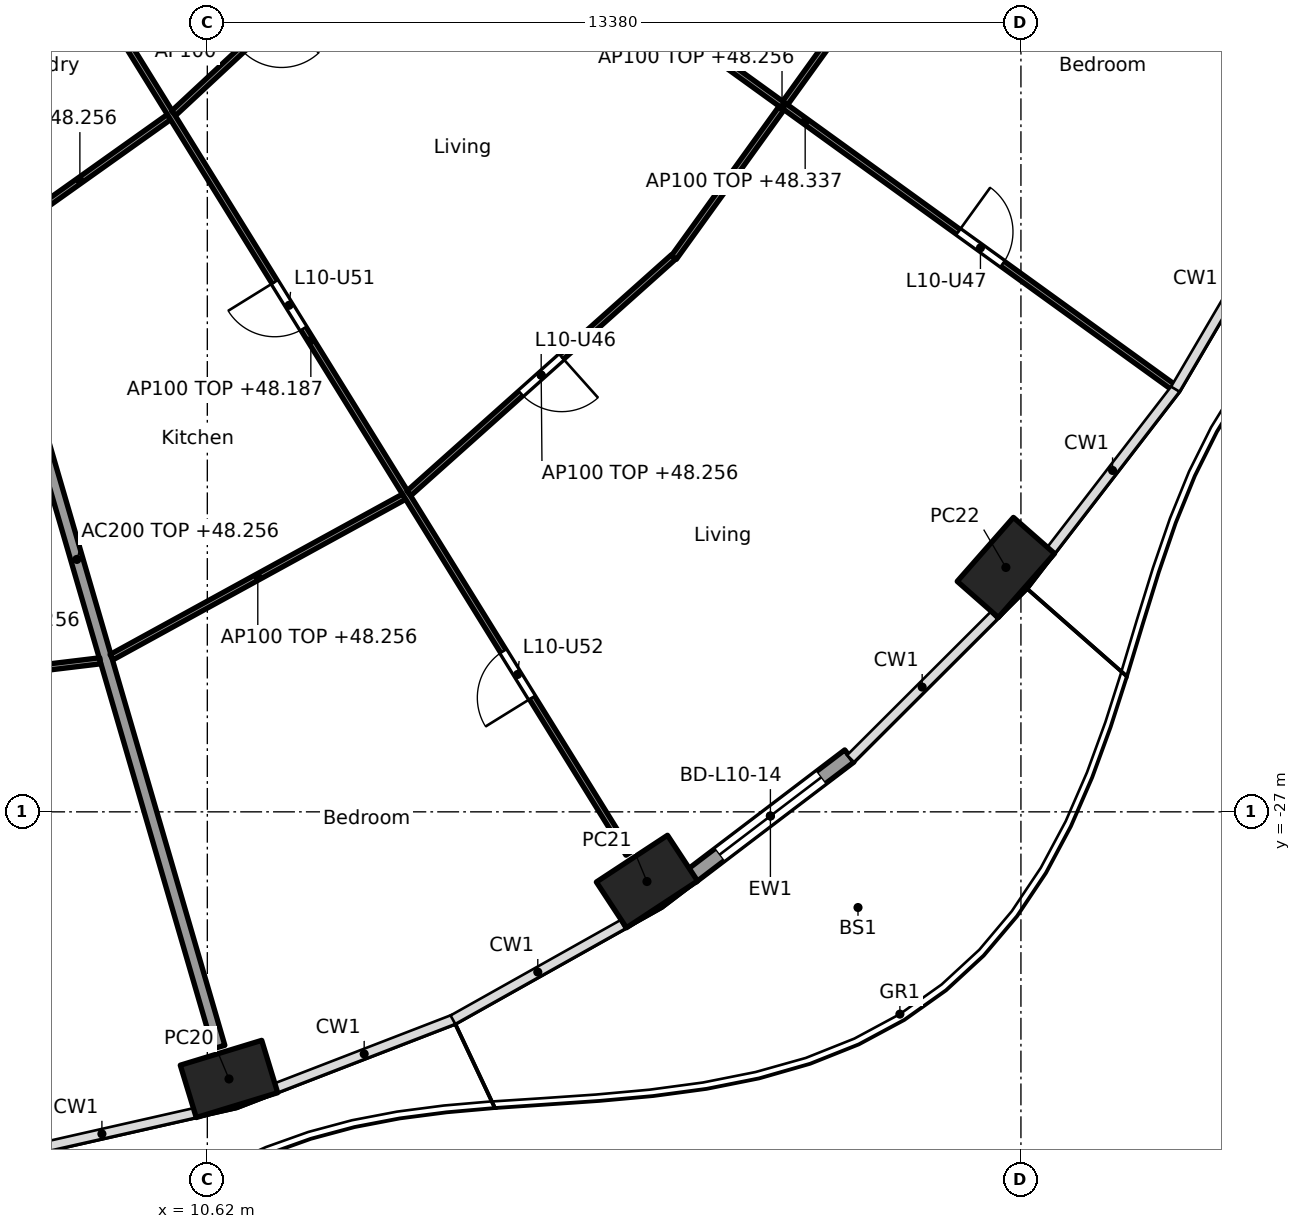
"""IFC4 building model, lengths in metres.
Left out: names, types, materials, properties, quantities, classifications, styles, units other than length and angle.
Written with IfcOpenShell. Run it as: python <this file> out.ifc"""

import sys

from ifc_helpers import new_model, si_unit, direction, frame, frame_2d, origin, origin_2d, place, context, subcontext, project, spatial, rectangle, hollow_rectangle, extrude, element, fill, save


model = new_model("IFC4")
c1 = context("Model", 3, precision=1e-05, world=origin(), true_north=direction((0.0, 1.0)))
c2 = subcontext(c1, "Body", "Model", "MODEL_VIEW")
j1 = project(units=[si_unit("LENGTHUNIT", "METRE"), si_unit("PLANEANGLEUNIT", "RADIAN")], contexts=[c1])
p1 = place(None, origin())
s1 = spatial("IfcSite", under=j1, at=p1, CompositionType="ELEMENT")
p2 = place(p1, origin())
s2 = spatial("IfcBuilding", under=s1, at=p2, CompositionType="ELEMENT")
p3 = place(p2, frame((0.0, 0.0, 45.5)))
s3 = spatial("IfcBuildingStorey", under=s2, at=p3, CompositionType="ELEMENT", Elevation=45.5)
for number, where, z_axis, x_axis in (
    (1, (10.976, -31.393, 0.0), (0.0, 0.0, 1.0), (0.957, 0.292, 0.0)),
    (2, (17.85, -28.146, 0.0), (0.0, 0.0, 1.0), (0.836, 0.549, 0.0)),
    (3, (23.752, -22.981, 0.0), (0.0, 0.0, 1.0), (0.66, 0.751, 0.0)),
):
    element("IfcColumn", number, at=place(p3, frame(where, z_axis=z_axis, x_axis=x_axis)), inside=s3, PredefinedType="COLUMN", context=c2, shape_type="SweptSolid", body=[
        extrude(hollow_rectangle(XDim=1.4, YDim=0.9, WallThickness=0.05, at=origin_2d()), origin(), (0.0, 0.0, 1.0), 3.7),
    ])
p4 = place(p3, frame((21.178, -26.081, 0.0), z_axis=(0.0, 0.0, 1.0), x_axis=(-0.796022293214, -0.605267303517, 0.0)))
e4 = element("IfcWall", 4, at=p4, inside=s3, PredefinedType="SOLIDWALL", context=c2, shape_type="SweptSolid", body=[
    extrude(rectangle(XDim=3.262, YDim=0.25, at=frame_2d((1.631, 0.0))), origin(), (0.0, 0.0, 1.0), 3.44),
])
p5 = place(p4, frame((0.581, 0.0, 0.0)))
e5 = element("IfcOpeningElement", 5, at=p5, cuts=e4, PredefinedType="OPENING", context=c2, shape_type="SweptSolid", body=[
    extrude(rectangle(XDim=2.1, YDim=2.4, at=frame_2d((1.05, 1.2))), frame((0.0, 0.135, 0.0), z_axis=(0.0, -1.0, 0.0), x_axis=(1.0, 0.0, 0.0)), (0.0, 0.0, 1.0), 0.27),
])
p6 = place(p3, frame((6.137, -14.83, 0.0), z_axis=(0.0, 0.0, 1.0), x_axis=(0.27985745069, -0.960041565399, 0.0)))
e6 = element("IfcWall", 6, at=p6, inside=s3, PredefinedType="PARTITIONING", context=c2, shape_type="SweptSolid", body=[
    extrude(rectangle(XDim=16.705, YDim=0.2, at=frame_2d((8.353, 0.0))), origin(), (0.0, 0.0, 1.0), 2.756),
])
p7 = place(p3, frame((2.941, -25.229, 0.0), z_axis=(0.0, 0.0, 1.0), x_axis=(0.992834127896, 0.119500604542, 0.0)))
e7 = element("IfcWall", 7, at=p7, inside=s3, PredefinedType="PARTITIONING", context=c2, shape_type="SweptSolid", body=[
    extrude(rectangle(XDim=5.959, YDim=0.1, at=frame_2d((2.98, 0.0))), origin(), (0.0, 0.0, 1.0), 2.756),
])
p8 = place(p3, frame((7.06, -17.657, 0.0), z_axis=(0.0, 0.0, 1.0), x_axis=(0.81492039338, 0.57957290521, 0.0)))
e8 = element("IfcWall", 8, at=p8, inside=s3, PredefinedType="PARTITIONING", context=c2, shape_type="SweptSolid", body=[
    extrude(rectangle(XDim=3.594, YDim=0.1, at=frame_2d((1.797, 0.0))), origin(), (0.0, 0.0, 1.0), 2.756),
])
p9 = place(p3, frame((9.045, -24.456, 0.0), z_axis=(0.0, 0.0, 1.0), x_axis=(0.876809987787, 0.480837025734, 0.0)))
e9 = element("IfcWall", 9, at=p9, inside=s3, PredefinedType="PARTITIONING", context=c2, shape_type="SweptSolid", body=[
    extrude(rectangle(XDim=5.486, YDim=0.1, at=frame_2d((2.743, 0.0))), origin(), (0.0, 0.0, 1.0), 2.756),
])
p10 = place(p3, frame((7.097, -10.81, 0.0), z_axis=(0.0, 0.0, 1.0), x_axis=(0.526453266471, -0.850204068576, 0.0)))
e10 = element("IfcWall", 10, at=p10, inside=s3, PredefinedType="PARTITIONING", context=c2, shape_type="SweptSolid", body=[
    extrude(rectangle(XDim=19.85, YDim=0.1, at=frame_2d((9.925, 0.0))), origin(), (0.0, 0.0, 1.0), 2.687),
])
p11 = place(p10, frame((0.35, 0.0, 0.0)))
e11 = element("IfcOpeningElement", 11, at=p11, cuts=e10, PredefinedType="OPENING", context=c2, shape_type="SweptSolid", body=[
    extrude(rectangle(XDim=0.9, YDim=2.1, at=frame_2d((0.45, 1.05))), frame((0.0, 0.06, 0.0), z_axis=(0.0, -1.0, 0.0), x_axis=(1.0, 0.0, 0.0)), (0.0, 0.0, 1.0), 0.12),
])
p12 = place(p10, frame((8.795, 0.0, 0.0)))
e12 = element("IfcOpeningElement", 12, at=p12, cuts=e10, PredefinedType="OPENING", context=c2, shape_type="SweptSolid", body=[
    extrude(rectangle(XDim=0.9, YDim=2.1, at=frame_2d((0.45, 1.05))), frame((0.0, 0.06, 0.0), z_axis=(0.0, -1.0, 0.0), x_axis=(1.0, 0.0, 0.0)), (0.0, 0.0, 1.0), 0.12),
])
p13 = place(p10, frame((15.935, 0.0, 0.0)))
e13 = element("IfcOpeningElement", 13, at=p13, cuts=e10, PredefinedType="OPENING", context=c2, shape_type="SweptSolid", body=[
    extrude(rectangle(XDim=0.9, YDim=2.1, at=frame_2d((0.45, 1.05))), frame((0.0, 0.06, 0.0), z_axis=(0.0, -1.0, 0.0), x_axis=(1.0, 0.0, 0.0)), (0.0, 0.0, 1.0), 0.12),
])
p14 = place(p3, frame((10.066, -15.511, 0.0), z_axis=(0.0, 0.0, 1.0), x_axis=(0.732022571638, 0.681280378855, 0.0)))
e14 = element("IfcWall", 14, at=p14, inside=s3, PredefinedType="PARTITIONING", context=c2, shape_type="SweptSolid", body=[
    extrude(rectangle(XDim=3.95, YDim=0.1, at=frame_2d((1.975, 0.0))), origin(), (0.0, 0.0, 1.0), 3.44),
])
p15 = place(p14, frame((1.525, 0.0, 0.0)))
e15 = element("IfcOpeningElement", 15, at=p15, cuts=e14, PredefinedType="OPENING", context=c2, shape_type="SweptSolid", body=[
    extrude(rectangle(XDim=0.9, YDim=2.1, at=frame_2d((0.45, 1.05))), frame((0.0, 0.06, 0.0), z_axis=(0.0, -1.0, 0.0), x_axis=(1.0, 0.0, 0.0)), (0.0, 0.0, 1.0), 0.12),
])
p16 = place(p3, frame((13.936, -21.761, 0.0), z_axis=(0.0, 0.0, 1.0), x_axis=(0.745806142791, 0.666163041136, 0.0)))
e16 = element("IfcWall", 16, at=p16, inside=s3, PredefinedType="PARTITIONING", context=c2, shape_type="SweptSolid", body=[
    extrude(rectangle(XDim=5.831, YDim=0.1, at=frame_2d((2.915, 0.0))), origin(), (0.0, 0.0, 1.0), 2.756),
])
p17 = place(p16, frame((2.465, 0.0, 0.0)))
e17 = element("IfcOpeningElement", 17, at=p17, cuts=e16, PredefinedType="OPENING", context=c2, shape_type="SweptSolid", body=[
    extrude(rectangle(XDim=0.9, YDim=2.1, at=frame_2d((0.45, 1.05))), frame((0.0, 0.06, 0.0), z_axis=(0.0, -1.0, 0.0), x_axis=(1.0, 0.0, 0.0)), (0.0, 0.0, 1.0), 0.12),
])
p18 = place(p3, frame((18.293, -17.884, 0.0), z_axis=(0.0, 0.0, 1.0), x_axis=(0.584558392935, 0.811351640936, 0.0)))
e18 = element("IfcWall", 18, at=p18, inside=s3, PredefinedType="PARTITIONING", context=c2, shape_type="SweptSolid", body=[
    extrude(rectangle(XDim=6.084, YDim=0.1, at=frame_2d((3.042, 0.0))), origin(), (0.0, 0.0, 1.0), 2.756),
])
p19 = place(p3, frame((14.329, -11.221, 0.0), z_axis=(0.0, 0.0, 1.0), x_axis=(0.810671130917, -0.58550176558, 0.0)))
e19 = element("IfcWall", 19, at=p19, inside=s3, PredefinedType="PARTITIONING", context=c2, shape_type="SweptSolid", body=[
    extrude(rectangle(XDim=15.106, YDim=0.1, at=frame_2d((7.553, 0.0))), origin(), (0.0, 0.0, 1.0), 2.837),
])
p20 = place(p19, frame((10.659, 0.0, 0.0)))
e20 = element("IfcOpeningElement", 20, at=p20, cuts=e19, PredefinedType="OPENING", context=c2, shape_type="SweptSolid", body=[
    extrude(rectangle(XDim=0.9, YDim=2.1, at=frame_2d((0.45, 1.05))), frame((0.0, 0.06, 0.0), z_axis=(0.0, -1.0, 0.0), x_axis=(1.0, 0.0, 0.0)), (0.0, 0.0, 1.0), 0.12),
])
p21 = place(p5, origin())
e21 = element("IfcDoor", 21, at=p21, inside=s3, OperationType="SLIDING_TO_LEFT", PredefinedType="DOOR", context=c2, shape_type="SweptSolid", body=[
    extrude(rectangle(XDim=2.1, YDim=2.4, at=frame_2d((1.05, 1.2))), frame((0.0, 0.025, 0.0), z_axis=(0.0, -1.0, 0.0), x_axis=(1.0, 0.0, 0.0)), (0.0, 0.0, 1.0), 0.05),
])
fill(e5, e21)
p22 = place(p17, frame((0.9, 0.0, 0.0), x_axis=(-1.0, 0.0, 0.0)))
e22 = element("IfcDoor", 22, at=p22, inside=s3, OperationType="SINGLE_SWING_LEFT", PredefinedType="DOOR", context=c2, shape_type="SweptSolid", body=[
    extrude(rectangle(XDim=0.9, YDim=2.1, at=frame_2d((0.45, 1.05))), frame((0.0, 0.025, 0.0), z_axis=(0.0, -1.0, 0.0), x_axis=(1.0, 0.0, 0.0)), (0.0, 0.0, 1.0), 0.05),
])
fill(e17, e22)
p23 = place(p20, origin())
e23 = element("IfcDoor", 23, at=p23, inside=s3, OperationType="SINGLE_SWING_LEFT", PredefinedType="DOOR", context=c2, shape_type="SweptSolid", body=[
    extrude(rectangle(XDim=0.9, YDim=2.1, at=frame_2d((0.45, 1.05))), frame((0.0, 0.025, 0.0), z_axis=(0.0, -1.0, 0.0), x_axis=(1.0, 0.0, 0.0)), (0.0, 0.0, 1.0), 0.05),
])
fill(e20, e23)
p24 = place(p12, frame((0.9, 0.0, 0.0), x_axis=(-1.0, 0.0, 0.0)))
e24 = element("IfcDoor", 24, at=p24, inside=s3, OperationType="SINGLE_SWING_RIGHT", PredefinedType="DOOR", context=c2, shape_type="SweptSolid", body=[
    extrude(rectangle(XDim=0.9, YDim=2.1, at=frame_2d((0.45, 1.05))), frame((0.0, 0.025, 0.0), z_axis=(0.0, -1.0, 0.0), x_axis=(1.0, 0.0, 0.0)), (0.0, 0.0, 1.0), 0.05),
])
fill(e12, e24)
p25 = place(p13, frame((0.9, 0.0, 0.0), x_axis=(-1.0, 0.0, 0.0)))
e25 = element("IfcDoor", 25, at=p25, inside=s3, OperationType="SINGLE_SWING_LEFT", PredefinedType="DOOR", context=c2, shape_type="SweptSolid", body=[
    extrude(rectangle(XDim=0.9, YDim=2.1, at=frame_2d((0.45, 1.05))), frame((0.0, 0.025, 0.0), z_axis=(0.0, -1.0, 0.0), x_axis=(1.0, 0.0, 0.0)), (0.0, 0.0, 1.0), 0.05),
])
fill(e13, e25)
save(model, sys.argv[1])
